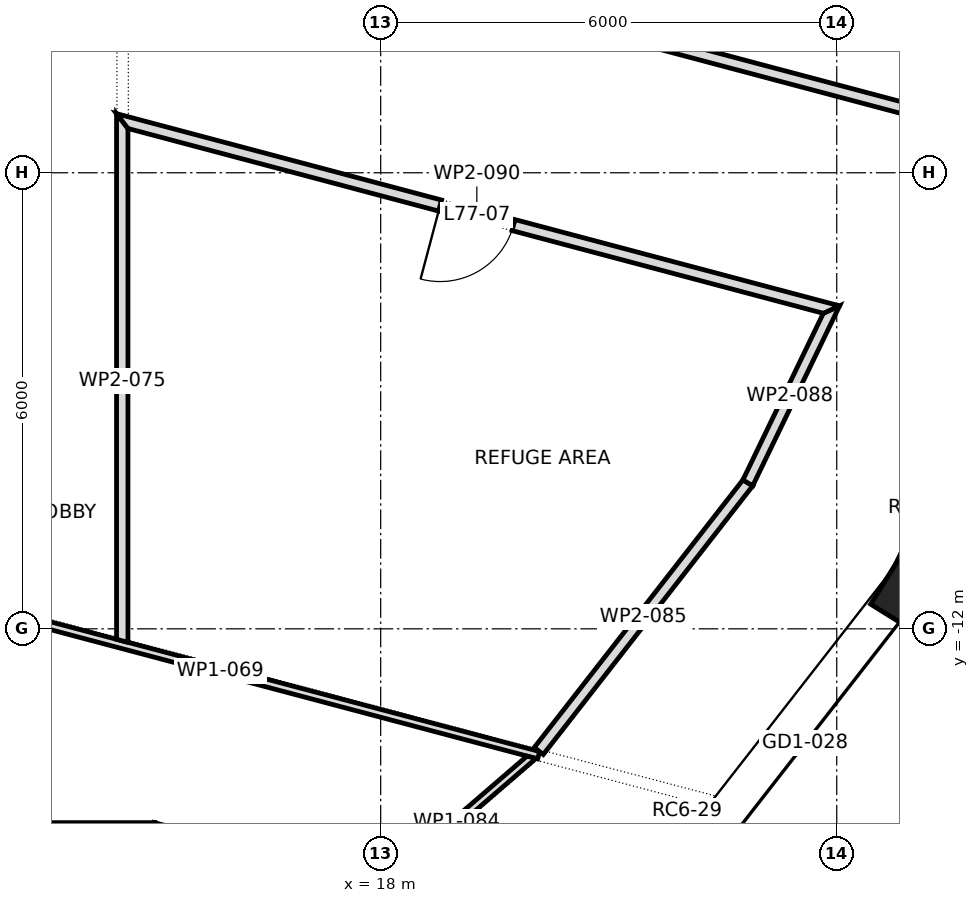
"""IFC4 building model, lengths in metres.
Left out: names, types, materials, properties, quantities, classifications, styles, units other than length and angle.
Written with IfcOpenShell. Run it as: python <this file> out.ifc"""

import sys

from ifc_helpers import new_model, si_unit, direction, frame, frame_2d, origin, origin_2d, place, context, subcontext, project, spatial, polyline, rectangle, outline, extrude, element, fill, save


model = new_model("IFC4")
c1 = context("Model", 3, precision=1e-05, world=origin(), true_north=direction((0.0, 1.0)))
c2 = subcontext(c1, "Body", "Model", "MODEL_VIEW")
j1 = project(units=[si_unit("LENGTHUNIT", "METRE"), si_unit("PLANEANGLEUNIT", "RADIAN")], contexts=[c1])
p1 = place(None, origin())
s1 = spatial("IfcSite", under=j1, at=p1, CompositionType="ELEMENT")
p2 = place(p1, origin())
s2 = spatial("IfcBuilding", under=s1, at=p2, CompositionType="ELEMENT")
p3 = place(p2, frame((0.0, 0.0, 328.3)))
s3 = spatial("IfcBuildingStorey", under=s2, at=p3, CompositionType="ELEMENT", Elevation=328.3)
p4 = place(p3, frame((25.135, -11.516, 0.0), z_axis=(0.0, 0.0, 1.0), x_axis=(0.529140496257, 0.848534227489, 0.0)))
e1 = element("IfcColumn", 1, at=p4, inside=s3, PredefinedType="COLUMN", context=c2, shape_type="SweptSolid", body=[
    extrude(rectangle(XDim=1.0, YDim=1.0, at=origin_2d()), origin(), (0.0, 0.0, 1.0), 5.0),
])
p5 = place(p3, frame((10.45, -14.6, 0.0), z_axis=(0.0, 0.0, 1.0), x_axis=(1.0, 0.0, 0.0)))
e2 = element("IfcWall", 2, at=p5, inside=s3, PredefinedType="PARTITIONING", context=c2, shape_type="SweptSolid", body=[
    extrude(outline(polyline([(0.0, -0.05), (1.52, -0.05), (3.04, -0.05), (4.56, -0.05), (4.573, 0.05), (4.573, 0.05), (3.049, 0.05), (1.524, 0.05), (0.0, 0.05), (0.0, -0.05)])), origin(), (0.0, 0.0, 1.0), 4.65),
])
p6 = place(p3, frame((11.7, -11.44, 0.0), z_axis=(0.0, 0.0, 1.0), x_axis=(0.966559990697, -0.256440605959, 0.0)))
e3 = element("IfcWall", 3, at=p6, inside=s3, PredefinedType="PARTITIONING", context=c2, shape_type="SweptSolid", body=[
    extrude(rectangle(XDim=8.668, YDim=0.1, at=frame_2d((4.334, 0.0))), origin(), (0.0, 0.0, 1.0), 4.65),
])
p7 = place(p3, frame((15.01, -14.598, 0.0), z_axis=(0.0, 0.0, 1.0), x_axis=(0.966889206018, -0.255196518952, 0.0)))
e4 = element("IfcWall", 4, at=p7, inside=s3, PredefinedType="PARTITIONING", context=c2, shape_type="SweptSolid", body=[
    extrude(outline(polyline([(0.013, -0.05), (1.495, -0.05), (2.977, -0.05), (3.04, 0.042), (3.061, 0.028), (3.076, 0.05), (3.076, 0.05), (1.538, 0.05), (0.0, 0.05), (0.013, -0.05), (0.013, -0.05), (0.013, -0.05)])), origin(), (0.0, 0.0, 1.0), 4.65),
])
p8 = place(p3, frame((14.6, -5.222, 0.0), z_axis=(0.0, 0.0, 1.0), x_axis=(0.0, -1.0, 0.0)))
e5 = element("IfcWall", 5, at=p8, inside=s3, PredefinedType="PARTITIONING", context=c2, shape_type="SweptSolid", body=[
    extrude(outline(polyline([(0.0, -0.075), (1.729, -0.075), (3.458, -0.075), (5.187, -0.075), (6.915, -0.075), (6.955, 0.074), (6.955, 0.075), (5.265, 0.075), (3.575, 0.075), (1.885, 0.075), (0.195, 0.075), (0.098, 0.0), (0.0, -0.075)])), origin(), (0.0, 0.0, 1.0), 4.65),
])
p9 = place(p3, frame((14.544, -2.405, 0.0), z_axis=(0.0, 0.0, 1.0), x_axis=(0.966468454351, -0.256785370969, 0.0)))
e6 = element("IfcWall", 6, at=p9, inside=s3, PredefinedType="PARTITIONING", context=c2, shape_type="SweptSolid", body=[
    extrude(outline(polyline([(10.844, -0.075), (10.844, -0.075), (10.689, 0.075), (8.927, 0.075), (7.165, 0.075), (5.402, 0.075), (3.64, 0.075), (1.878, 0.075), (0.115, 0.075), (0.0, -0.075), (1.807, -0.075), (3.615, -0.075), (5.422, -0.075), (7.229, -0.075), (9.037, -0.075), (10.844, -0.075)])), origin(), (0.0, 0.0, 1.0), 4.65),
])
p10 = place(p9, frame((4.912, 0.0, 0.0)))
e7 = element("IfcOpeningElement", 7, at=p10, cuts=e6, PredefinedType="OPENING", context=c2, shape_type="SweptSolid", body=[
    extrude(rectangle(XDim=1.0, YDim=2.1, at=frame_2d((0.5, 1.05))), frame((0.0, 0.087, 0.0), z_axis=(0.0, -1.0, 0.0), x_axis=(1.0, 0.0, 0.0)), (0.0, 0.0, 1.0), 0.174),
])
p11 = place(p3, frame((18.01, -15.39, 0.0), z_axis=(0.0, 0.0, 1.0), x_axis=(0.757687492776, 0.652617547489, 0.0)))
e8 = element("IfcWall", 8, at=p11, inside=s3, PredefinedType="PARTITIONING", context=c2, shape_type="SweptSolid", body=[
    extrude(outline(polyline([(2.64, -0.05), (2.64, -0.05), (2.571, 0.05), (1.299, 0.05), (0.026, 0.05), (0.0, 0.032), (0.0, -0.05), (1.32, -0.05), (2.64, -0.05)])), origin(), (0.0, 0.0, 1.0), 4.65),
])
p12 = place(p3, frame((20.08, -13.607, 0.0), z_axis=(0.0, 0.0, 1.0), x_axis=(0.614871892474, 0.788627006794, 0.0)))
e9 = element("IfcWall", 9, at=p12, inside=s3, PredefinedType="PARTITIONING", context=c2, shape_type="SweptSolid", body=[
    extrude(outline(polyline([(4.481, -0.075), (4.481, -0.074), (4.465, 0.075), (2.977, 0.075), (1.488, 0.075), (0.0, 0.075), (0.0, -0.075), (1.494, -0.075), (2.987, -0.075), (4.481, -0.075)])), origin(), (0.0, 0.0, 1.0), 4.65),
])
p13 = place(p3, frame((22.826, -10.087, 0.0), z_axis=(0.0, 0.0, 1.0), x_axis=(0.434582931339, 0.900631820329, 0.0)))
e10 = element("IfcWall", 10, at=p13, inside=s3, PredefinedType="PARTITIONING", context=c2, shape_type="SweptSolid", body=[
    extrude(outline(polyline([(0.0, -0.075), (1.315, -0.075), (2.63, -0.075), (2.449, 0.075), (0.016, 0.075), (0.0, -0.075)])), origin(), (0.0, 0.0, 1.0), 4.65),
])
p14 = place(p3, frame((24.018, -7.823, 0.0), z_axis=(0.0, 0.0, 1.0), x_axis=(-0.966442126826, 0.256884439963, 0.0)))
e11 = element("IfcWall", 11, at=p14, inside=s3, PredefinedType="PARTITIONING", context=c2, shape_type="SweptSolid", body=[
    extrude(outline(polyline([(0.0, -0.075), (1.969, -0.075), (3.937, -0.075), (5.905, -0.075), (7.874, -0.075), (9.842, -0.075), (9.647, 0.075), (7.754, 0.075), (5.861, 0.075), (3.968, 0.075), (2.074, 0.075), (0.181, 0.075), (0.0, -0.075), (0.0, -0.075)])), origin(), (0.0, 0.0, 1.0), 4.65),
])
p15 = place(p14, frame((4.418, 0.0, 0.0)))
e12 = element("IfcOpeningElement", 12, at=p15, cuts=e11, PredefinedType="OPENING", context=c2, shape_type="SweptSolid", body=[
    extrude(rectangle(XDim=1.0, YDim=2.1, at=frame_2d((0.5, 1.05))), frame((0.0, 0.087, 0.0), z_axis=(0.0, -1.0, 0.0), x_axis=(1.0, 0.0, 0.0)), (0.0, 0.0, 1.0), 0.174),
])
p16 = place(p15, origin())
e13 = element("IfcDoor", 13, at=p16, inside=s3, OperationType="SINGLE_SWING_LEFT", PredefinedType="DOOR", context=c2, shape_type="SweptSolid", body=[
    extrude(rectangle(XDim=1.0, YDim=2.1, at=frame_2d((0.5, 1.05))), frame((0.0, 0.025, 0.0), z_axis=(0.0, -1.0, 0.0), x_axis=(1.0, 0.0, 0.0)), (0.0, 0.0, 1.0), 0.05),
])
fill(e12, e13)
save(model, sys.argv[1])
